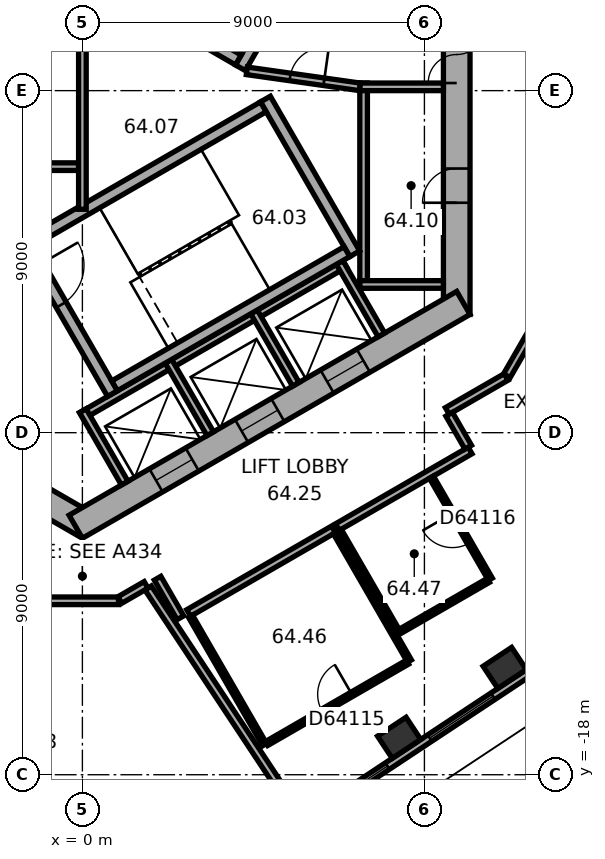
"""IFC4 building model, lengths in metres.
Left out: names, types, materials, properties, quantities, classifications, styles, units other than length and angle.
Written with IfcOpenShell. Run it as: python <this file> out.ifc"""

import sys

from ifc_helpers import new_model, si_unit, direction, frame, frame_2d, origin, origin_2d, place, context, subcontext, project, spatial, rectangle, extrude, element, fill, save


model = new_model("IFC4")
c1 = context("Model", 3, precision=1e-05, world=origin(), true_north=direction((0.0, 1.0)))
c2 = subcontext(c1, "Body", "Model", "MODEL_VIEW")
j1 = project(units=[si_unit("LENGTHUNIT", "METRE"), si_unit("PLANEANGLEUNIT", "RADIAN")], contexts=[c1])
p1 = place(None, origin())
s1 = spatial("IfcSite", under=j1, at=p1, CompositionType="ELEMENT")
p2 = place(p1, origin())
s2 = spatial("IfcBuilding", under=s1, at=p2, CompositionType="ELEMENT")
p3 = place(p2, frame((0.0, 0.0, 259.8)))
s3 = spatial("IfcBuildingStorey", under=s2, at=p3, CompositionType="ELEMENT", Elevation=259.8)
for number, where, z_axis, x_axis in (
    (1, (8.335, -17.028, 0.0), (0.0, 0.0, 1.0), (0.834, 0.552, 0.0)),
    (2, (11.113, -15.189, 0.0), (0.0, 0.0, 1.0), (0.834, 0.552, 0.0)),
):
    element("IfcColumn", number, at=place(p3, frame(where, z_axis=z_axis, x_axis=x_axis)), inside=s3, PredefinedType="COLUMN", context=c2, shape_type="SweptSolid", body=[
        extrude(rectangle(XDim=0.9, YDim=0.7, at=origin_2d()), origin(), (0.0, 0.0, 1.0), 3.7),
    ])
p4 = place(p3, frame((9.85, -5.889, 0.0), z_axis=(0.0, 0.0, 1.0), x_axis=(0.0, 1.0, 0.0)))
e3 = element("IfcWall", 3, at=p4, inside=s3, PredefinedType="SHEAR", context=c2, shape_type="SweptSolid", body=[
    extrude(rectangle(XDim=11.778, YDim=0.7, at=frame_2d((5.889, 0.0))), origin(), (0.0, 0.0, 1.0), 3.7),
])
p5 = place(p4, frame((6.089, 0.0, 0.0)))
e4 = element("IfcOpeningElement", 4, at=p5, cuts=e3, PredefinedType="OPENING", context=c2, shape_type="SweptSolid", body=[
    extrude(rectangle(XDim=1.5, YDim=2.1, at=frame_2d((0.75, 1.05))), frame((0.0, 0.36, 0.0), z_axis=(0.0, -1.0, 0.0), x_axis=(1.0, 0.0, 0.0)), (0.0, 0.0, 1.0), 0.72),
])
p6 = place(p4, frame((2.939, 0.0, 0.0)))
e5 = element("IfcOpeningElement", 5, at=p6, cuts=e3, PredefinedType="OPENING", context=c2, shape_type="SweptSolid", body=[
    extrude(rectangle(XDim=0.9, YDim=2.1, at=frame_2d((0.45, 1.05))), frame((0.0, 0.36, 0.0), z_axis=(0.0, -1.0, 0.0), x_axis=(1.0, 0.0, 0.0)), (0.0, 0.0, 1.0), 0.72),
])
p7 = place(p3, frame((-10.025, -5.586, 0.0), z_axis=(0.0, 0.0, 1.0), x_axis=(0.866026453023, -0.499998182661, 0.0)))
e6 = element("IfcWall", 6, at=p7, inside=s3, PredefinedType="SHEAR", context=c2, shape_type="SweptSolid", body=[
    extrude(rectangle(XDim=11.778, YDim=0.7, at=frame_2d((5.889, 0.0))), origin(), (0.0, 0.0, 1.0), 3.7),
])
p8 = place(p7, frame((6.089, 0.0, 0.0)))
e7 = element("IfcOpeningElement", 7, at=p8, cuts=e6, PredefinedType="OPENING", context=c2, shape_type="SweptSolid", body=[
    extrude(rectangle(XDim=1.5, YDim=2.1, at=frame_2d((0.75, 1.05))), frame((0.0, 0.36, 0.0), z_axis=(0.0, -1.0, 0.0), x_axis=(1.0, 0.0, 0.0)), (0.0, 0.0, 1.0), 0.72),
])
p9 = place(p7, frame((1.539, 0.0, 0.0)))
e8 = element("IfcOpeningElement", 8, at=p9, cuts=e6, PredefinedType="OPENING", context=c2, shape_type="SweptSolid", body=[
    extrude(rectangle(XDim=1.1, YDim=2.1, at=frame_2d((0.55, 1.05))), frame((0.0, 0.36, 0.0), z_axis=(0.0, -1.0, 0.0), x_axis=(1.0, 0.0, 0.0)), (0.0, 0.0, 1.0), 0.72),
])
p10 = place(p7, frame((4.139, 0.0, 0.0)))
e9 = element("IfcOpeningElement", 9, at=p10, cuts=e6, PredefinedType="OPENING", context=c2, shape_type="SweptSolid", body=[
    extrude(rectangle(XDim=1.1, YDim=2.1, at=frame_2d((0.55, 1.05))), frame((0.0, 0.36, 0.0), z_axis=(0.0, -1.0, 0.0), x_axis=(1.0, 0.0, 0.0)), (0.0, 0.0, 1.0), 0.72),
])
p11 = place(p3, frame((-0.175, -11.475, 0.0), z_axis=(0.0, 0.0, 1.0), x_axis=(0.866026453023, 0.499998182661, 0.0)))
e10 = element("IfcWall", 10, at=p11, inside=s3, PredefinedType="SHEAR", context=c2, shape_type="SweptSolid", body=[
    extrude(rectangle(XDim=11.778, YDim=0.7, at=frame_2d((5.889, 0.0))), origin(), (0.0, 0.0, 1.0), 3.7),
])
p12 = place(p11, frame((2.439, 0.0, 0.0)))
e11 = element("IfcOpeningElement", 11, at=p12, cuts=e10, PredefinedType="OPENING", context=c2, shape_type="SweptSolid", body=[
    extrude(rectangle(XDim=1.1, YDim=2.1, at=frame_2d((0.55, 1.05))), frame((0.0, 0.36, 0.0), z_axis=(0.0, -1.0, 0.0), x_axis=(1.0, 0.0, 0.0)), (0.0, 0.0, 1.0), 0.72),
])
p13 = place(p11, frame((5.039, 0.0, 0.0)))
e12 = element("IfcOpeningElement", 12, at=p13, cuts=e10, PredefinedType="OPENING", context=c2, shape_type="SweptSolid", body=[
    extrude(rectangle(XDim=1.1, YDim=2.1, at=frame_2d((0.55, 1.05))), frame((0.0, 0.36, 0.0), z_axis=(0.0, -1.0, 0.0), x_axis=(1.0, 0.0, 0.0)), (0.0, 0.0, 1.0), 0.72),
])
p14 = place(p11, frame((7.639, 0.0, 0.0)))
e13 = element("IfcOpeningElement", 13, at=p14, cuts=e10, PredefinedType="OPENING", context=c2, shape_type="SweptSolid", body=[
    extrude(rectangle(XDim=1.1, YDim=2.1, at=frame_2d((0.55, 1.05))), frame((0.0, 0.36, 0.0), z_axis=(0.0, -1.0, 0.0), x_axis=(1.0, 0.0, 0.0)), (0.0, 0.0, 1.0), 0.72),
])
p15 = place(p3, frame((2.58, -21.377, 0.0), z_axis=(0.0, 0.0, 1.0), x_axis=(0.833888592176, 0.551932800112, 0.0)))
e14 = element("IfcWall", 14, at=p15, inside=s3, PredefinedType="STANDARD", context=c2, shape_type="SweptSolid", body=[
    extrude(rectangle(XDim=17.731, YDim=0.2, at=frame_2d((8.866, 0.0))), origin(), (0.0, 0.0, 1.0), 3.7),
])
p16 = place(p15, frame((1.202, 0.0, 0.9)))
e15 = element("IfcOpeningElement", 15, at=p16, cuts=e14, PredefinedType="OPENING", context=c2, shape_type="SweptSolid", body=[
    extrude(rectangle(XDim=2.0, YDim=2.0, at=frame_2d((1.0, 1.0))), frame((0.0, 0.11, 0.0), z_axis=(0.0, -1.0, 0.0), x_axis=(1.0, 0.0, 0.0)), (0.0, 0.0, 1.0), 0.22),
])
p17 = place(p15, frame((4.533, 0.0, 0.9)))
e16 = element("IfcOpeningElement", 16, at=p17, cuts=e14, PredefinedType="OPENING", context=c2, shape_type="SweptSolid", body=[
    extrude(rectangle(XDim=2.0, YDim=2.0, at=frame_2d((1.0, 1.0))), frame((0.0, 0.11, 0.0), z_axis=(0.0, -1.0, 0.0), x_axis=(1.0, 0.0, 0.0)), (0.0, 0.0, 1.0), 0.22),
])
p18 = place(p15, frame((7.865, 0.0, 0.9)))
e17 = element("IfcOpeningElement", 17, at=p18, cuts=e14, PredefinedType="OPENING", context=c2, shape_type="SweptSolid", body=[
    extrude(rectangle(XDim=2.0, YDim=2.0, at=frame_2d((1.0, 1.0))), frame((0.0, 0.11, 0.0), z_axis=(0.0, -1.0, 0.0), x_axis=(1.0, 0.0, 0.0)), (0.0, 0.0, 1.0), 0.22),
])
p19 = place(p15, frame((11.197, 0.0, 0.9)))
e18 = element("IfcOpeningElement", 18, at=p19, cuts=e14, PredefinedType="OPENING", context=c2, shape_type="SweptSolid", body=[
    extrude(rectangle(XDim=2.0, YDim=2.0, at=frame_2d((1.0, 1.0))), frame((0.0, 0.11, 0.0), z_axis=(0.0, -1.0, 0.0), x_axis=(1.0, 0.0, 0.0)), (0.0, 0.0, 1.0), 0.22),
])
p20 = place(p15, frame((14.528, 0.0, 0.9)))
e19 = element("IfcOpeningElement", 19, at=p20, cuts=e14, PredefinedType="OPENING", context=c2, shape_type="SweptSolid", body=[
    extrude(rectangle(XDim=2.0, YDim=2.0, at=frame_2d((1.0, 1.0))), frame((0.0, 0.11, 0.0), z_axis=(0.0, -1.0, 0.0), x_axis=(1.0, 0.0, 0.0)), (0.0, 0.0, 1.0), 0.22),
])
p21 = place(p3, frame((7.4, -5.2, 0.0), z_axis=(0.0, 0.0, 1.0), x_axis=(0.0, 1.0, 0.0)))
e20 = element("IfcWall", 20, at=p21, inside=s3, PredefinedType="PARTITIONING", context=c2, shape_type="SweptSolid", body=[
    extrude(rectangle(XDim=5.4, YDim=0.2, at=frame_2d((2.7, 0.0))), origin(), (0.0, 0.0, 1.0), 3.42),
])
for number, where, z_axis, x_axis in (
    (21, (7.3, -5.1, 0.0), (0.0, 0.0, 1.0), (1.0, 0.0, 0.0)),
    (22, (7.3, 0.1, 0.0), (0.0, 0.0, 1.0), (1.0, 0.0, 0.0)),
):
    element("IfcWall", number, at=place(p3, frame(where, z_axis=z_axis, x_axis=x_axis)), inside=s3, PredefinedType="PARTITIONING", context=c2, shape_type="SweptSolid", body=[
        extrude(rectangle(XDim=2.2, YDim=0.2, at=frame_2d((1.1, 0.0))), origin(), (0.0, 0.0, 1.0), 3.42),
    ])
p22 = place(p3, frame((-0.024, -8.559, 0.0), z_axis=(0.0, 0.0, 1.0), x_axis=(0.866026010844, 0.49999894854, 0.0)))
e23 = element("IfcWall", 23, at=p22, inside=s3, PredefinedType="PARTITIONING", context=c2, shape_type="SweptSolid", body=[
    extrude(rectangle(XDim=8.0, YDim=0.2, at=frame_2d((4.0, 0.0))), origin(), (0.0, 0.0, 1.0), 3.42),
])
for number, where, z_axis, x_axis in (
    (24, (0.013, -8.422, 0.0), (0.0, 0.0, 1.0), (0.5, -0.866, 0.0)),
    (25, (2.264, -7.122, 0.0), (0.0, 0.0, 1.0), (0.5, -0.866, 0.0)),
    (26, (4.516, -5.822, 0.0), (0.0, 0.0, 1.0), (0.5, -0.866, 0.0)),
    (27, (6.768, -4.522, 0.0), (0.0, 0.0, 1.0), (0.5, -0.866, 0.0)),
):
    element("IfcWall", number, at=place(p3, frame(where, z_axis=z_axis, x_axis=x_axis)), inside=s3, PredefinedType="PARTITIONING", context=c2, shape_type="SweptSolid", body=[
        extrude(rectangle(XDim=2.2, YDim=0.2, at=frame_2d((1.1, 0.0))), origin(), (0.0, 0.0, 1.0), 3.42),
    ])
p23 = place(p3, frame((4.158, 0.602, 0.0), z_axis=(0.0, 0.0, 1.0), x_axis=(0.499977259774, 0.866038532462, 0.0)))
e28 = element("IfcWall", 28, at=p23, inside=s3, PredefinedType="SHEAR", context=c2, shape_type="SweptSolid", body=[
    extrude(rectangle(XDim=4.7, YDim=0.3, at=frame_2d((2.35, 0.0))), origin(), (0.0, 0.0, 1.0), 3.42),
])
p24 = place(p23, frame((0.8, 0.0, 0.0)))
e29 = element("IfcOpeningElement", 29, at=p24, cuts=e28, PredefinedType="OPENING", context=c2, shape_type="SweptSolid", body=[
    extrude(rectangle(XDim=1.2, YDim=2.1, at=frame_2d((0.6, 1.05))), frame((0.0, 0.16, 0.0), z_axis=(0.0, -1.0, 0.0), x_axis=(1.0, 0.0, 0.0)), (0.0, 0.0, 1.0), 0.32),
])
p25 = place(p3, frame((4.103, 0.807, 0.0), z_axis=(0.0, 0.0, 1.0), x_axis=(-0.866027801685, 0.499995846692, 0.0)))
e30 = element("IfcWall", 30, at=p25, inside=s3, PredefinedType="SHEAR", context=c2, shape_type="SweptSolid", body=[
    extrude(rectangle(XDim=7.06, YDim=0.3, at=frame_2d((3.53, 0.0))), origin(), (0.0, 0.0, 1.0), 3.42),
])
p26 = place(p3, frame((-1.558, -3.902, 0.0), z_axis=(0.0, 0.0, 1.0), x_axis=(0.499977259774, -0.866038532462, 0.0)))
e31 = element("IfcWall", 31, at=p26, inside=s3, PredefinedType="SHEAR", context=c2, shape_type="SweptSolid", body=[
    extrude(rectangle(XDim=4.7, YDim=0.3, at=frame_2d((2.35, 0.0))), origin(), (0.0, 0.0, 1.0), 3.42),
])
p27 = place(p26, frame((0.8, 0.0, 0.0)))
e32 = element("IfcOpeningElement", 32, at=p27, cuts=e31, PredefinedType="OPENING", context=c2, shape_type="SweptSolid", body=[
    extrude(rectangle(XDim=1.2, YDim=2.1, at=frame_2d((0.6, 1.05))), frame((0.0, 0.16, 0.0), z_axis=(0.0, -1.0, 0.0), x_axis=(1.0, 0.0, 0.0)), (0.0, 0.0, 1.0), 0.32),
])
p28 = place(p3, frame((4.816, -0.222, 0.0), z_axis=(0.0, 0.0, 1.0), x_axis=(0.499977259774, -0.866038532462, 0.0)))
e33 = element("IfcWall", 33, at=p28, inside=s3, PredefinedType="SHEAR", context=c2, shape_type="SweptSolid", body=[
    extrude(rectangle(XDim=4.7, YDim=0.3, at=frame_2d((2.35, 0.0))), origin(), (0.0, 0.0, 1.0), 3.42),
])
for number, where, z_axis, x_axis in (
    (34, (-1.353, -3.957, 0.0), (0.0, 0.0, 1.0), (0.866, 0.5, 0.0)),
    (35, (0.847, -7.767, 0.0), (0.0, 0.0, 1.0), (0.866, 0.5, 0.0)),
):
    element("IfcWall", number, at=place(p3, frame(where, z_axis=z_axis, x_axis=x_axis)), inside=s3, PredefinedType="SHEAR", context=c2, shape_type="SweptSolid", body=[
        extrude(rectangle(XDim=7.06, YDim=0.3, at=frame_2d((3.53, 0.0))), origin(), (0.0, 0.0, 1.0), 3.42),
    ])
p29 = place(p3, frame((4.327, 0.521, 0.0), z_axis=(0.0, 0.0, 1.0), x_axis=(0.990124376366, -0.14019172346, 0.0)))
e36 = element("IfcWall", 36, at=p29, inside=s3, PredefinedType="PARTITIONING", context=c2, shape_type="SweptSolid", body=[
    extrude(rectangle(XDim=3.002, YDim=0.2, at=frame_2d((1.501, 0.0))), origin(), (0.0, 0.0, 1.0), 3.42),
])
p30 = place(p29, frame((1.15, 0.0, 0.0)))
e37 = element("IfcOpeningElement", 37, at=p30, cuts=e36, PredefinedType="OPENING", context=c2, shape_type="SweptSolid", body=[
    extrude(rectangle(XDim=0.9, YDim=2.1, at=frame_2d((0.45, 1.05))), frame((0.0, 0.11, 0.0), z_axis=(0.0, -1.0, 0.0), x_axis=(1.0, 0.0, 0.0)), (0.0, 0.0, 1.0), 0.22),
])
p31 = place(p3, frame((-2.72, -2.0, 0.0), z_axis=(0.0, 0.0, 1.0), x_axis=(1.0, 0.0, 0.0)))
e38 = element("IfcWall", 38, at=p31, inside=s3, PredefinedType="PARTITIONING", context=c2, shape_type="SweptSolid", body=[
    extrude(rectangle(XDim=2.62, YDim=0.2, at=frame_2d((1.31, 0.0))), origin(), (0.0, 0.0, 1.0), 3.42),
])
p32 = place(p3, frame((0.0, -3.122, 0.0), z_axis=(0.0, 0.0, 1.0), x_axis=(0.0, 1.0, 0.0)))
e39 = element("IfcWall", 39, at=p32, inside=s3, PredefinedType="PARTITIONING", context=c2, shape_type="SweptSolid", body=[
    extrude(rectangle(XDim=6.245, YDim=0.2, at=frame_2d((3.122, 0.0))), origin(), (0.0, 0.0, 1.0), 3.42),
])
p33 = place(p3, frame((-0.91, -13.423, 0.0), z_axis=(0.0, 0.0, 1.0), x_axis=(1.0, 0.0, 0.0)))
e40 = element("IfcWall", 40, at=p33, inside=s3, PredefinedType="PARTITIONING", context=c2, shape_type="SweptSolid", body=[
    extrude(rectangle(XDim=1.86, YDim=0.2, at=frame_2d((0.93, 0.0))), origin(), (0.0, 0.0, 1.0), 3.42),
])
p34 = place(p3, frame((0.985, -13.403, 0.0), z_axis=(0.0, 0.0, 1.0), x_axis=(0.866032814021, 0.499987164874, 0.0)))
e41 = element("IfcWall", 41, at=p34, inside=s3, PredefinedType="PARTITIONING", context=c2, shape_type="SweptSolid", body=[
    extrude(rectangle(XDim=0.798, YDim=0.2, at=frame_2d((0.399, 0.0))), origin(), (0.0, 0.0, 1.0), 3.42),
])
p35 = place(p3, frame((1.979, -12.829, 0.0), z_axis=(0.0, 0.0, 1.0), x_axis=(0.500074377092, -0.865982457891, 0.0)))
e42 = element("IfcWall", 42, at=p35, inside=s3, PredefinedType="PARTITIONING", context=c2, shape_type="SweptSolid", body=[
    extrude(rectangle(XDim=1.201, YDim=0.2, at=frame_2d((0.601, 0.0))), origin(), (0.0, 0.0, 1.0), 3.42),
])
p36 = place(p3, frame((2.796, -13.744, 0.0), z_axis=(0.0, 0.0, 1.0), x_axis=(0.866018331238, 0.50001224981, 0.0)))
e43 = element("IfcWall", 43, at=p36, inside=s3, PredefinedType="PARTITIONING", context=c2, shape_type="SweptSolid", body=[
    extrude(rectangle(XDim=4.4, YDim=0.2, at=frame_2d((2.2, 0.0))), origin(), (0.0, 0.0, 1.0), 3.42),
])
p37 = place(p3, frame((4.796, -17.208, 0.0), z_axis=(0.0, 0.0, 1.0), x_axis=(-0.500043961785, 0.866000020948, 0.0)))
e44 = element("IfcWall", 44, at=p37, inside=s3, PredefinedType="PARTITIONING", context=c2, shape_type="SweptSolid", body=[
    extrude(rectangle(XDim=3.9, YDim=0.12, at=frame_2d((1.95, 0.0))), origin(), (0.0, 0.0, 1.0), 3.42),
])
p38 = place(p3, frame((5.364, -18.575, 0.0), z_axis=(0.0, 0.0, 1.0), x_axis=(-0.55195757761, 0.833872191957, 0.0)))
e45 = element("IfcWall", 45, at=p38, inside=s3, PredefinedType="PARTITIONING", context=c2, shape_type="SweptSolid", body=[
    extrude(rectangle(XDim=6.581, YDim=0.2, at=frame_2d((3.291, 0.0))), origin(), (0.0, 0.0, 1.0), 3.42),
])
p39 = place(p3, frame((6.656, -11.631, 0.0), z_axis=(0.0, 0.0, 1.0), x_axis=(0.499997012787, -0.866027128446, 0.0)))
e46 = element("IfcWall", 46, at=p39, inside=s3, PredefinedType="PARTITIONING", context=c2, shape_type="SweptSolid", body=[
    extrude(rectangle(XDim=3.9, YDim=0.12, at=frame_2d((1.95, 0.0))), origin(), (0.0, 0.0, 1.0), 3.42),
])
p40 = place(p3, frame((6.71, -11.485, 0.0), z_axis=(0.0, 0.0, 1.0), x_axis=(0.866021232452, 0.500007224889, 0.0)))
e47 = element("IfcWall", 47, at=p40, inside=s3, PredefinedType="PARTITIONING", context=c2, shape_type="SweptSolid", body=[
    extrude(rectangle(XDim=4.032, YDim=0.2, at=frame_2d((2.016, 0.0))), origin(), (0.0, 0.0, 1.0), 3.42),
])
p41 = place(p3, frame((8.31, -14.256, 0.0), z_axis=(0.0, 0.0, 1.0), x_axis=(-0.49999285859, 0.86602952684, 0.0)))
e48 = element("IfcWall", 48, at=p41, inside=s3, PredefinedType="PARTITIONING", context=c2, shape_type="SweptSolid", body=[
    extrude(rectangle(XDim=3.1, YDim=0.12, at=frame_2d((1.55, 0.0))), origin(), (0.0, 0.0, 1.0), 3.42),
])
p42 = place(p3, frame((8.554, -15.039, 0.0), z_axis=(0.0, 0.0, 1.0), x_axis=(-0.865994635417, -0.500053288589, 0.0)))
e49 = element("IfcWall", 49, at=p42, inside=s3, PredefinedType="PARTITIONING", context=c2, shape_type="SweptSolid", body=[
    extrude(rectangle(XDim=4.28, YDim=0.12, at=frame_2d((2.14, 0.0))), origin(), (0.0, 0.0, 1.0), 3.42),
])
p43 = place(p42, frame((1.69, 0.0, 0.0)))
e50 = element("IfcOpeningElement", 50, at=p43, cuts=e49, PredefinedType="OPENING", context=c2, shape_type="SweptSolid", body=[
    extrude(rectangle(XDim=0.9, YDim=2.1, at=frame_2d((0.45, 1.05))), frame((0.0, 0.07, 0.0), z_axis=(0.0, -1.0, 0.0), x_axis=(1.0, 0.0, 0.0)), (0.0, 0.0, 1.0), 0.14),
])
p44 = place(p3, frame((9.185, -10.171, 0.0), z_axis=(0.0, 0.0, 1.0), x_axis=(0.500026960575, -0.86600983753, 0.0)))
e51 = element("IfcWall", 51, at=p44, inside=s3, PredefinedType="PARTITIONING", context=c2, shape_type="SweptSolid", body=[
    extrude(rectangle(XDim=3.1, YDim=0.12, at=frame_2d((1.55, 0.0))), origin(), (0.0, 0.0, 1.0), 3.42),
])
p45 = place(p44, frame((1.1, 0.0, 0.0)))
e52 = element("IfcOpeningElement", 52, at=p45, cuts=e51, PredefinedType="OPENING", context=c2, shape_type="SweptSolid", body=[
    extrude(rectangle(XDim=0.9, YDim=2.1, at=frame_2d((0.45, 1.05))), frame((0.0, 0.07, 0.0), z_axis=(0.0, -1.0, 0.0), x_axis=(1.0, 0.0, 0.0)), (0.0, 0.0, 1.0), 0.14),
])
p46 = place(p3, frame((9.602, -8.428, 0.0), z_axis=(0.0, 0.0, 1.0), x_axis=(0.865999114786, 0.500045531117, 0.0)))
e53 = element("IfcWall", 53, at=p46, inside=s3, PredefinedType="PARTITIONING", context=c2, shape_type="SweptSolid", body=[
    extrude(rectangle(XDim=1.788, YDim=0.2, at=frame_2d((0.894, 0.0))), origin(), (0.0, 0.0, 1.0), 3.42),
])
p47 = place(p3, frame((10.152, -9.382, 0.0), z_axis=(0.0, 0.0, 1.0), x_axis=(-0.499968756647, 0.866043441391, 0.0)))
e54 = element("IfcWall", 54, at=p47, inside=s3, PredefinedType="PARTITIONING", context=c2, shape_type="SweptSolid", body=[
    extrude(rectangle(XDim=1.001, YDim=0.2, at=frame_2d((0.5, 0.0))), origin(), (0.0, 0.0, 1.0), 3.42),
])
p48 = place(p3, frame((10.683, -12.886, 0.0), z_axis=(0.0, 0.0, 1.0), x_axis=(-0.86599746015, -0.500048396672, 0.0)))
e55 = element("IfcWall", 55, at=p48, inside=s3, PredefinedType="PARTITIONING", context=c2, shape_type="SweptSolid", body=[
    extrude(rectangle(XDim=2.68, YDim=0.12, at=frame_2d((1.34, 0.0))), origin(), (0.0, 0.0, 1.0), 3.42),
])
p49 = place(p3, frame((11.17, -7.5, 0.0), z_axis=(0.0, 0.0, 1.0), x_axis=(0.500006454166, 0.866021677438, 0.0)))
e56 = element("IfcWall", 56, at=p49, inside=s3, PredefinedType="PARTITIONING", context=c2, shape_type="SweptSolid", body=[
    extrude(rectangle(XDim=1.86, YDim=0.2, at=frame_2d((0.93, 0.0))), origin(), (0.0, 0.0, 1.0), 3.42),
])
p50 = place(p17, origin())
e57 = element("IfcWindow", 57, at=p50, inside=s3, PartitioningType="SINGLE_PANEL", PredefinedType="WINDOW", context=c2, shape_type="SweptSolid", body=[
    extrude(rectangle(XDim=2.0, YDim=2.0, at=frame_2d((1.0, 1.0))), frame((0.0, 0.03, 0.0), z_axis=(0.0, -1.0, 0.0), x_axis=(1.0, 0.0, 0.0)), (0.0, 0.0, 1.0), 0.06),
])
fill(e16, e57)
p51 = place(p18, origin())
e58 = element("IfcWindow", 58, at=p51, inside=s3, PartitioningType="SINGLE_PANEL", PredefinedType="WINDOW", context=c2, shape_type="SweptSolid", body=[
    extrude(rectangle(XDim=2.0, YDim=2.0, at=frame_2d((1.0, 1.0))), frame((0.0, 0.03, 0.0), z_axis=(0.0, -1.0, 0.0), x_axis=(1.0, 0.0, 0.0)), (0.0, 0.0, 1.0), 0.06),
])
fill(e17, e58)
p52 = place(p5, origin())
e59 = element("IfcDoor", 59, at=p52, inside=s3, OperationType="DOUBLE_DOOR_SINGLE_SWING", PredefinedType="DOOR", context=c2, shape_type="SweptSolid", body=[
    extrude(rectangle(XDim=1.5, YDim=2.1, at=frame_2d((0.75, 1.05))), frame((0.0, 0.025, 0.0), z_axis=(0.0, -1.0, 0.0), x_axis=(1.0, 0.0, 0.0)), (0.0, 0.0, 1.0), 0.05),
])
fill(e4, e59)
p53 = place(p27, origin())
e60 = element("IfcDoor", 60, at=p53, inside=s3, OperationType="SINGLE_SWING_RIGHT", PredefinedType="DOOR", context=c2, shape_type="SweptSolid", body=[
    extrude(rectangle(XDim=1.2, YDim=2.1, at=frame_2d((0.6, 1.05))), frame((0.0, 0.025, 0.0), z_axis=(0.0, -1.0, 0.0), x_axis=(1.0, 0.0, 0.0)), (0.0, 0.0, 1.0), 0.05),
])
fill(e32, e60)
p54 = place(p30, origin())
e61 = element("IfcDoor", 61, at=p54, inside=s3, OperationType="SINGLE_SWING_LEFT", PredefinedType="DOOR", context=c2, shape_type="SweptSolid", body=[
    extrude(rectangle(XDim=0.9, YDim=2.1, at=frame_2d((0.45, 1.05))), frame((0.0, 0.025, 0.0), z_axis=(0.0, -1.0, 0.0), x_axis=(1.0, 0.0, 0.0)), (0.0, 0.0, 1.0), 0.05),
])
fill(e37, e61)
p55 = place(p6, origin())
e62 = element("IfcDoor", 62, at=p55, inside=s3, OperationType="SINGLE_SWING_LEFT", PredefinedType="DOOR", context=c2, shape_type="SweptSolid", body=[
    extrude(rectangle(XDim=0.9, YDim=2.1, at=frame_2d((0.45, 1.05))), frame((0.0, 0.025, 0.0), z_axis=(0.0, -1.0, 0.0), x_axis=(1.0, 0.0, 0.0)), (0.0, 0.0, 1.0), 0.05),
])
fill(e5, e62)
p56 = place(p12, origin())
e63 = element("IfcDoor", 63, at=p56, inside=s3, OperationType="DOUBLE_DOOR_SLIDING", PredefinedType="DOOR", context=c2, shape_type="SweptSolid", body=[
    extrude(rectangle(XDim=1.1, YDim=2.1, at=frame_2d((0.55, 1.05))), frame((0.0, 0.025, 0.0), z_axis=(0.0, -1.0, 0.0), x_axis=(1.0, 0.0, 0.0)), (0.0, 0.0, 1.0), 0.05),
])
fill(e11, e63)
p57 = place(p13, origin())
e64 = element("IfcDoor", 64, at=p57, inside=s3, OperationType="DOUBLE_DOOR_SLIDING", PredefinedType="DOOR", context=c2, shape_type="SweptSolid", body=[
    extrude(rectangle(XDim=1.1, YDim=2.1, at=frame_2d((0.55, 1.05))), frame((0.0, 0.025, 0.0), z_axis=(0.0, -1.0, 0.0), x_axis=(1.0, 0.0, 0.0)), (0.0, 0.0, 1.0), 0.05),
])
fill(e12, e64)
p58 = place(p14, origin())
e65 = element("IfcDoor", 65, at=p58, inside=s3, OperationType="DOUBLE_DOOR_SLIDING", PredefinedType="DOOR", context=c2, shape_type="SweptSolid", body=[
    extrude(rectangle(XDim=1.1, YDim=2.1, at=frame_2d((0.55, 1.05))), frame((0.0, 0.025, 0.0), z_axis=(0.0, -1.0, 0.0), x_axis=(1.0, 0.0, 0.0)), (0.0, 0.0, 1.0), 0.05),
])
fill(e13, e65)
p59 = place(p43, origin())
e66 = element("IfcDoor", 66, at=p59, inside=s3, OperationType="SINGLE_SWING_LEFT", PredefinedType="DOOR", context=c2, shape_type="SweptSolid", body=[
    extrude(rectangle(XDim=0.9, YDim=2.1, at=frame_2d((0.45, 1.05))), frame((0.0, 0.025, 0.0), z_axis=(0.0, -1.0, 0.0), x_axis=(1.0, 0.0, 0.0)), (0.0, 0.0, 1.0), 0.05),
])
fill(e50, e66)
p60 = place(p45, origin())
e67 = element("IfcDoor", 67, at=p60, inside=s3, OperationType="SINGLE_SWING_LEFT", PredefinedType="DOOR", context=c2, shape_type="SweptSolid", body=[
    extrude(rectangle(XDim=0.9, YDim=2.1, at=frame_2d((0.45, 1.05))), frame((0.0, 0.025, 0.0), z_axis=(0.0, -1.0, 0.0), x_axis=(1.0, 0.0, 0.0)), (0.0, 0.0, 1.0), 0.05),
])
fill(e52, e67)
save(model, sys.argv[1])
